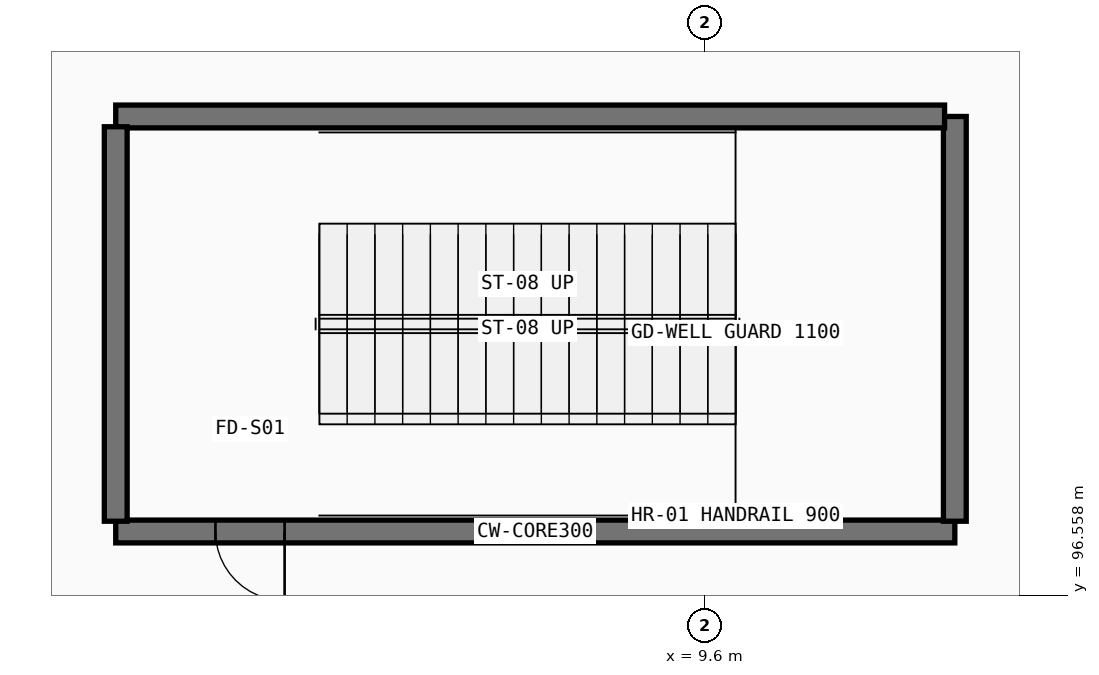
"""IFC4 building model, lengths in metres.
Left out: names, types, materials, properties, quantities, classifications, styles, units other than length and angle.
Written with IfcOpenShell. Run it as: python <this file> out.ifc"""

import sys

from ifc_helpers import new_model, si_unit, direction, frame, frame_2d, origin, place, context, subcontext, project, spatial, rectangle, extrude, element, fill, save


model = new_model("IFC4")
c1 = context("Model", 3, precision=1e-05, world=origin(), true_north=direction((0.0, 1.0)))
c2 = subcontext(c1, "Body", "Model", "MODEL_VIEW")
j1 = project(units=[si_unit("LENGTHUNIT", "METRE"), si_unit("PLANEANGLEUNIT", "RADIAN")], contexts=[c1])
p1 = place(None, origin())
s1 = spatial("IfcSite", under=j1, at=p1, CompositionType="ELEMENT")
p2 = place(p1, origin())
s2 = spatial("IfcBuilding", under=s1, at=p2, CompositionType="ELEMENT")
p3 = place(p2, origin())
s3 = spatial("IfcBuildingStorey", under=s2, at=p3, CompositionType="ELEMENT", Elevation=0.0)
p4 = place(p3, frame((12.89, 97.4, 0.0), z_axis=(0.0, 0.0, 1.0), x_axis=(-1.0, 0.0, 0.0)))
e1 = element("IfcWall", 1, at=p4, inside=s3, PredefinedType="SHEAR", context=c2, shape_type="SweptSolid", body=[
    extrude(rectangle(XDim=11.04, YDim=0.3, at=frame_2d((5.52, 0.0))), origin(), (0.0, 0.0, 1.0), 5.75),
])
p5 = place(p4, frame((8.818, 0.0, 0.0)))
e2 = element("IfcOpeningElement", 2, at=p5, cuts=e1, PredefinedType="OPENING", context=c2, shape_type="SweptSolid", body=[
    extrude(rectangle(XDim=0.91, YDim=2.08, at=frame_2d((0.455, 1.04))), frame((0.0, 0.16, 0.0), z_axis=(0.0, -1.0, 0.0), x_axis=(1.0, 0.0, 0.0)), (0.0, 0.0, 1.0), 0.32),
])
p6 = place(p3, frame((12.89, 102.86, 0.0), z_axis=(0.0, 0.0, 1.0), x_axis=(0.0, -1.0, 0.0)))
e3 = element("IfcWall", 3, at=p6, inside=s3, PredefinedType="SHEAR", context=c2, shape_type="SweptSolid", body=[
    extrude(rectangle(XDim=5.325, YDim=0.3, at=frame_2d((2.663, 0.0))), origin(), (0.0, 0.0, 1.0), 5.75),
])
p7 = place(p3, frame((1.85, 102.86, 0.0), z_axis=(0.0, 0.0, 1.0), x_axis=(1.0, 0.0, 0.0)))
e4 = element("IfcWall", 4, at=p7, inside=s3, PredefinedType="SHEAR", context=c2, shape_type="SweptSolid", body=[
    extrude(rectangle(XDim=10.905, YDim=0.3, at=frame_2d((5.452, 0.0))), origin(), (0.0, 0.0, 1.0), 5.75),
])
p8 = place(p3, frame((1.85, 97.535, 0.0), z_axis=(0.0, 0.0, 1.0), x_axis=(0.0, 1.0, 0.0)))
e5 = element("IfcWall", 5, at=p8, inside=s3, PredefinedType="SHEAR", context=c2, shape_type="SweptSolid", body=[
    extrude(rectangle(XDim=5.19, YDim=0.3, at=frame_2d((2.595, 0.0))), origin(), (0.0, 0.0, 1.0), 5.75),
])
p9 = place(p5, origin())
e6 = element("IfcDoor", 6, at=p9, inside=s3, OperationType="SINGLE_SWING_RIGHT", PredefinedType="DOOR", context=c2, shape_type="SweptSolid", body=[
    extrude(rectangle(XDim=0.91, YDim=2.08, at=frame_2d((0.455, 1.04))), frame((0.0, 0.025, 0.0), z_axis=(0.0, -1.0, 0.0), x_axis=(1.0, 0.0, 0.0)), (0.0, 0.0, 1.0), 0.05),
])
fill(e2, e6)
save(model, sys.argv[1])
